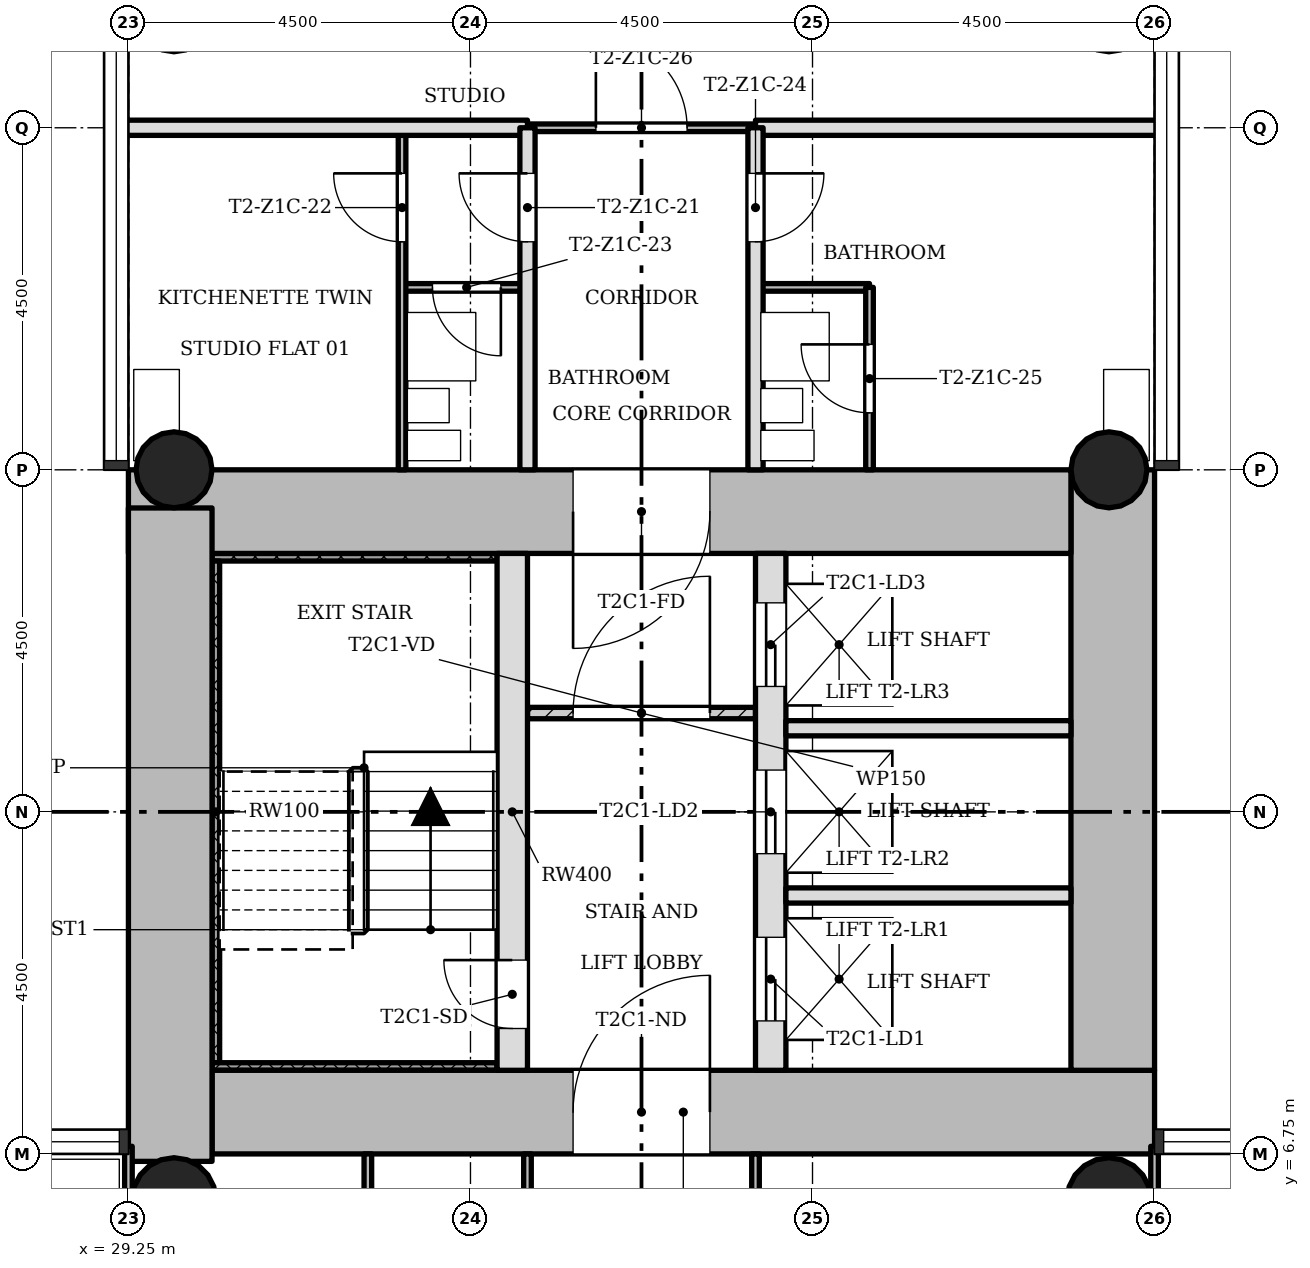
"""IFC4 building model, lengths in metres.
Left out: names, types, materials, properties, quantities, classifications, styles, units other than length and angle.
Written with IfcOpenShell. Run it as: python <this file> out.ifc"""

import sys

from ifc_helpers import new_model, si_unit, direction, frame, frame_2d, origin, origin_2d, place, context, subcontext, project, spatial, rectangle, hollow_circle, extrude, element, fill, save


model = new_model("IFC4")
c1 = context("Model", 3, precision=1e-05, world=origin(), true_north=direction((0.0, 1.0)))
c2 = subcontext(c1, "Body", "Model", "MODEL_VIEW")
j1 = project(units=[si_unit("LENGTHUNIT", "METRE"), si_unit("PLANEANGLEUNIT", "RADIAN")], contexts=[c1])
p1 = place(None, origin())
s1 = spatial("IfcSite", under=j1, at=p1, CompositionType="ELEMENT")
p2 = place(p1, origin())
s2 = spatial("IfcBuilding", under=s1, at=p2, CompositionType="ELEMENT")
p3 = place(p2, frame((0.0, 0.0, 48.3)))
s3 = spatial("IfcBuildingStorey", under=s2, at=p3, CompositionType="ELEMENT", Elevation=48.3)
p4 = place(p3, frame((30.35, 7.3, 0.0), z_axis=(0.0, 0.0, 1.0), x_axis=(1.0, 0.0, 0.0)))
e1 = element("IfcWall", 1, at=p4, inside=s3, PredefinedType="SHEAR", context=c2, shape_type="SweptSolid", body=[
    extrude(rectangle(XDim=12.4, YDim=1.1, at=frame_2d((6.2, 0.0))), origin(), (0.0, 0.0, 1.0), 3.4),
])
p5 = place(p4, frame((4.75, 0.0, 0.0)))
e2 = element("IfcOpeningElement", 2, at=p5, cuts=e1, PredefinedType="OPENING", context=c2, shape_type="SweptSolid", body=[
    extrude(rectangle(XDim=1.8, YDim=2.1, at=frame_2d((0.9, 1.05))), frame((0.0, 0.56, 0.0), z_axis=(0.0, -1.0, 0.0), x_axis=(1.0, 0.0, 0.0)), (0.0, 0.0, 1.0), 1.12),
])
p6 = place(p3, frame((42.2, 7.85, 0.0), z_axis=(0.0, 0.0, 1.0), x_axis=(0.0, 1.0, 0.0)))
e3 = element("IfcWall", 3, at=p6, inside=s3, PredefinedType="SHEAR", context=c2, shape_type="SweptSolid", body=[
    extrude(rectangle(XDim=7.9, YDim=1.1, at=frame_2d((3.95, 0.0))), origin(), (0.0, 0.0, 1.0), 3.4),
])
p7 = place(p3, frame((41.65, 15.2, 0.0), z_axis=(0.0, 0.0, 1.0), x_axis=(-1.0, 0.0, 0.0)))
e4 = element("IfcWall", 4, at=p7, inside=s3, PredefinedType="SHEAR", context=c2, shape_type="SweptSolid", body=[
    extrude(rectangle(XDim=12.4, YDim=1.1, at=frame_2d((6.2, 0.0))), origin(), (0.0, 0.0, 1.0), 3.4),
])
p8 = place(p7, frame((4.75, 0.0, 0.0)))
e5 = element("IfcOpeningElement", 5, at=p8, cuts=e4, PredefinedType="OPENING", context=c2, shape_type="SweptSolid", body=[
    extrude(rectangle(XDim=1.8, YDim=2.1, at=frame_2d((0.9, 1.05))), frame((0.0, 0.56, 0.0), z_axis=(0.0, -1.0, 0.0), x_axis=(1.0, 0.0, 0.0)), (0.0, 0.0, 1.0), 1.12),
])
p9 = place(p3, frame((29.8, 15.248, 0.0), z_axis=(0.0, 0.0, 1.0), x_axis=(0.0, -1.0, 0.0)))
e6 = element("IfcWall", 6, at=p9, inside=s3, PredefinedType="SHEAR", context=c2, shape_type="SweptSolid", body=[
    extrude(rectangle(XDim=8.596, YDim=1.1, at=frame_2d((4.298, 0.0))), origin(), (0.0, 0.0, 1.0), 3.4),
])
p10 = place(p3, frame((34.3, 7.85, 0.0), z_axis=(0.0, 0.0, 1.0), x_axis=(0.0, 1.0, 0.0)))
e7 = element("IfcWall", 7, at=p10, inside=s3, PredefinedType="SHEAR", context=c2, shape_type="SweptSolid", body=[
    extrude(rectangle(XDim=6.8, YDim=0.4, at=frame_2d((3.4, 0.0))), origin(), (0.0, 0.0, 1.0), 3.4),
])
p11 = place(p10, frame((0.55, 0.0, 0.0)))
e8 = element("IfcOpeningElement", 8, at=p11, cuts=e7, PredefinedType="OPENING", context=c2, shape_type="SweptSolid", body=[
    extrude(rectangle(XDim=0.9, YDim=2.1, at=frame_2d((0.45, 1.05))), frame((0.0, 0.21, 0.0), z_axis=(0.0, -1.0, 0.0), x_axis=(1.0, 0.0, 0.0)), (0.0, 0.0, 1.0), 0.42),
])
p12 = place(p3, frame((37.7, 7.85, 0.0), z_axis=(0.0, 0.0, 1.0), x_axis=(0.0, 1.0, 0.0)))
e9 = element("IfcWall", 9, at=p12, inside=s3, PredefinedType="SHEAR", context=c2, shape_type="SweptSolid", body=[
    extrude(rectangle(XDim=6.8, YDim=0.4, at=frame_2d((3.4, 0.0))), origin(), (0.0, 0.0, 1.0), 3.4),
])
p13 = place(p12, frame((0.65, 0.0, 0.0)))
e10 = element("IfcOpeningElement", 10, at=p13, cuts=e9, PredefinedType="OPENING", context=c2, shape_type="SweptSolid", body=[
    extrude(rectangle(XDim=1.1, YDim=2.1, at=frame_2d((0.55, 1.05))), frame((0.0, 0.21, 0.0), z_axis=(0.0, -1.0, 0.0), x_axis=(1.0, 0.0, 0.0)), (0.0, 0.0, 1.0), 0.42),
])
p14 = place(p12, frame((2.85, 0.0, 0.0)))
e11 = element("IfcOpeningElement", 11, at=p14, cuts=e9, PredefinedType="OPENING", context=c2, shape_type="SweptSolid", body=[
    extrude(rectangle(XDim=1.1, YDim=2.1, at=frame_2d((0.55, 1.05))), frame((0.0, 0.21, 0.0), z_axis=(0.0, -1.0, 0.0), x_axis=(1.0, 0.0, 0.0)), (0.0, 0.0, 1.0), 0.42),
])
p15 = place(p12, frame((5.05, 0.0, 0.0)))
e12 = element("IfcOpeningElement", 12, at=p15, cuts=e9, PredefinedType="OPENING", context=c2, shape_type="SweptSolid", body=[
    extrude(rectangle(XDim=1.1, YDim=2.1, at=frame_2d((0.55, 1.05))), frame((0.0, 0.21, 0.0), z_axis=(0.0, -1.0, 0.0), x_axis=(1.0, 0.0, 0.0)), (0.0, 0.0, 1.0), 0.42),
])
for number, where, z_axis, x_axis in (
    (13, (42.15, 15.75, 0.0), (0.0, 0.0, 1.0), (1.0, 0.0, 0.0)),
    (14, (29.85, 15.75, 0.0), (0.0, 0.0, 1.0), (1.0, 0.0, 0.0)),
):
    element("IfcColumn", number, at=place(p3, frame(where, z_axis=z_axis, x_axis=x_axis)), inside=s3, PredefinedType="COLUMN", context=c2, shape_type="SweptSolid", body=[
        extrude(hollow_circle(Radius=0.5, WallThickness=0.036, at=origin_2d()), origin(), (0.0, 0.0, 1.0), 3.4),
    ])
for number, where, z_axis, x_axis in (
    (15, (42.15, 6.15, 0.0), (0.0, 0.0, 1.0), (1.0, 0.0, 0.0)),
    (16, (29.85, 6.15, 0.0), (0.0, 0.0, 1.0), (1.0, 0.0, 0.0)),
):
    element("IfcColumn", number, at=place(p3, frame(where, z_axis=z_axis, x_axis=x_axis)), inside=s3, PredefinedType="COLUMN", context=c2, shape_type="SweptSolid", body=[
        extrude(hollow_circle(Radius=0.55, WallThickness=0.04, at=origin_2d()), origin(), (0.0, 0.0, 1.0), 3.4),
    ])
p16 = place(p3, frame((37.5, 12.55, 0.0), z_axis=(0.0, 0.0, 1.0), x_axis=(-1.0, 0.0, 0.0)))
e17 = element("IfcWall", 17, at=p16, inside=s3, PredefinedType="PARTITIONING", context=c2, shape_type="SweptSolid", body=[
    extrude(rectangle(XDim=3.0, YDim=0.15, at=frame_2d((1.5, 0.0))), origin(), (0.0, 0.0, 1.0), 3.0),
])
p17 = place(p16, frame((0.6, 0.0, 0.0)))
e18 = element("IfcOpeningElement", 18, at=p17, cuts=e17, PredefinedType="OPENING", context=c2, shape_type="SweptSolid", body=[
    extrude(rectangle(XDim=1.8, YDim=2.1, at=frame_2d((0.9, 1.05))), frame((0.0, 0.085, 0.0), z_axis=(0.0, -1.0, 0.0), x_axis=(1.0, 0.0, 0.0)), (0.0, 0.0, 1.0), 0.17),
])
for number, where, z_axis, x_axis in (
    (19, (41.65, 10.15, 0.0), (0.0, 0.0, 1.0), (-1.0, 0.0, 0.0)),
    (20, (41.65, 12.35, 0.0), (0.0, 0.0, 1.0), (-1.0, 0.0, 0.0)),
):
    element("IfcWall", number, at=place(p3, frame(where, z_axis=z_axis, x_axis=x_axis)), inside=s3, PredefinedType="SOLIDWALL", context=c2, shape_type="SweptSolid", body=[
        extrude(rectangle(XDim=3.75, YDim=0.2, at=frame_2d((1.875, 0.0))), origin(), (0.0, 0.0, 1.0), 3.0),
    ])
p18 = place(p3, frame((39.0, 18.15, 0.0), z_axis=(0.0, 0.0, 1.0), x_axis=(-1.0, 0.0, 0.0)))
e21 = element("IfcWall", 21, at=p18, inside=s3, PredefinedType="PARTITIONING", context=c2, shape_type="SweptSolid", body=[
    extrude(rectangle(XDim=1.5, YDim=0.1, at=frame_2d((0.75, 0.0))), origin(), (0.0, 0.0, 1.0), 3.0),
])
p19 = place(p3, frame((34.5, 18.15, 0.0), z_axis=(0.0, 0.0, 1.0), x_axis=(-1.0, 0.0, 0.0)))
e22 = element("IfcWall", 22, at=p19, inside=s3, PredefinedType="PARTITIONING", context=c2, shape_type="SweptSolid", body=[
    extrude(rectangle(XDim=1.65, YDim=0.1, at=frame_2d((0.825, 0.0))), origin(), (0.0, 0.0, 1.0), 3.0),
])
p20 = place(p19, frame((0.35, 0.0, 0.0)))
e23 = element("IfcOpeningElement", 23, at=p20, cuts=e22, PredefinedType="OPENING", context=c2, shape_type="SweptSolid", body=[
    extrude(rectangle(XDim=0.9, YDim=2.1, at=frame_2d((0.45, 1.05))), frame((0.0, 0.06, 0.0), z_axis=(0.0, -1.0, 0.0), x_axis=(1.0, 0.0, 0.0)), (0.0, 0.0, 1.0), 0.12),
])
p21 = place(p3, frame((37.5, 20.25, 0.0), z_axis=(0.0, 0.0, 1.0), x_axis=(-1.0, 0.0, 0.0)))
e24 = element("IfcWall", 24, at=p21, inside=s3, PredefinedType="PARTITIONING", context=c2, shape_type="SweptSolid", body=[
    extrude(rectangle(XDim=3.0, YDim=0.1, at=frame_2d((1.5, 0.0))), origin(), (0.0, 0.0, 1.0), 3.0),
])
p22 = place(p21, frame((0.9, 0.0, 0.0)))
e25 = element("IfcOpeningElement", 25, at=p22, cuts=e24, PredefinedType="OPENING", context=c2, shape_type="SweptSolid", body=[
    extrude(rectangle(XDim=1.2, YDim=2.1, at=frame_2d((0.6, 1.05))), frame((0.0, 0.06, 0.0), z_axis=(0.0, -1.0, 0.0), x_axis=(1.0, 0.0, 0.0)), (0.0, 0.0, 1.0), 0.12),
])
for number, where, z_axis, x_axis in (
    (26, (42.85, 20.25, 0.0), (0.0, 0.0, 1.0), (-1.0, 0.0, 0.0)),
    (27, (34.5, 20.25, 0.0), (0.0, 0.0, 1.0), (-1.0, 0.0, 0.0)),
):
    element("IfcWall", number, at=place(p3, frame(where, z_axis=z_axis, x_axis=x_axis)), inside=s3, PredefinedType="SOLIDWALL", context=c2, shape_type="SweptSolid", body=[
        extrude(rectangle(XDim=5.35, YDim=0.2, at=frame_2d((2.675, 0.0))), origin(), (0.0, 0.0, 1.0), 3.0),
    ])
p23 = place(p3, frame((42.75, 0.9, 0.0), z_axis=(0.0, 0.0, 1.0), x_axis=(0.0, 1.0, 0.0)))
e28 = element("IfcWall", 28, at=p23, inside=s3, PredefinedType="PARTITIONING", context=c2, shape_type="SweptSolid", body=[
    extrude(rectangle(XDim=5.95, YDim=0.1, at=frame_2d((2.975, 0.0))), origin(), (0.0, 0.0, 1.0), 3.0),
])
p24 = place(p3, frame((39.0, 15.75, 0.0), z_axis=(0.0, 0.0, 1.0), x_axis=(0.0, 1.0, 0.0)))
e29 = element("IfcWall", 29, at=p24, inside=s3, PredefinedType="PARTITIONING", context=c2, shape_type="SweptSolid", body=[
    extrude(rectangle(XDim=2.4, YDim=0.1, at=frame_2d((1.2, 0.0))), origin(), (0.0, 0.0, 1.0), 3.0),
])
p25 = place(p24, frame((0.75, 0.0, 0.0)))
e30 = element("IfcOpeningElement", 30, at=p25, cuts=e29, PredefinedType="OPENING", context=c2, shape_type="SweptSolid", body=[
    extrude(rectangle(XDim=0.9, YDim=2.1, at=frame_2d((0.45, 1.05))), frame((0.0, 0.06, 0.0), z_axis=(0.0, -1.0, 0.0), x_axis=(1.0, 0.0, 0.0)), (0.0, 0.0, 1.0), 0.12),
])
p26 = place(p3, frame((37.5, 0.9, 0.0), z_axis=(0.0, 0.0, 1.0), x_axis=(0.0, 1.0, 0.0)))
e31 = element("IfcWall", 31, at=p26, inside=s3, PredefinedType="PARTITIONING", context=c2, shape_type="SweptSolid", body=[
    extrude(rectangle(XDim=5.85, YDim=0.1, at=frame_2d((2.925, 0.0))), origin(), (0.0, 0.0, 1.0), 3.0),
])
p27 = place(p26, frame((2.475, 0.0, 0.0)))
e32 = element("IfcOpeningElement", 32, at=p27, cuts=e31, PredefinedType="OPENING", context=c2, shape_type="SweptSolid", body=[
    extrude(rectangle(XDim=0.9, YDim=2.1, at=frame_2d((0.45, 1.05))), frame((0.0, 0.06, 0.0), z_axis=(0.0, -1.0, 0.0), x_axis=(1.0, 0.0, 0.0)), (0.0, 0.0, 1.0), 0.12),
])
p28 = place(p3, frame((37.5, 15.75, 0.0), z_axis=(0.0, 0.0, 1.0), x_axis=(0.0, 1.0, 0.0)))
e33 = element("IfcWall", 33, at=p28, inside=s3, PredefinedType="SOLIDWALL", context=c2, shape_type="SweptSolid", body=[
    extrude(rectangle(XDim=4.5, YDim=0.2, at=frame_2d((2.25, 0.0))), origin(), (0.0, 0.0, 1.0), 3.0),
])
p29 = place(p28, frame((3.0, 0.0, 0.0)))
e34 = element("IfcOpeningElement", 34, at=p29, cuts=e33, PredefinedType="OPENING", context=c2, shape_type="SweptSolid", body=[
    extrude(rectangle(XDim=0.9, YDim=2.1, at=frame_2d((0.45, 1.05))), frame((0.0, 0.11, 0.0), z_axis=(0.0, -1.0, 0.0), x_axis=(1.0, 0.0, 0.0)), (0.0, 0.0, 1.0), 0.22),
])
p30 = place(p3, frame((34.5, 0.9, 0.0), z_axis=(0.0, 0.0, 1.0), x_axis=(0.0, 1.0, 0.0)))
e35 = element("IfcWall", 35, at=p30, inside=s3, PredefinedType="PARTITIONING", context=c2, shape_type="SweptSolid", body=[
    extrude(rectangle(XDim=5.85, YDim=0.1, at=frame_2d((2.925, 0.0))), origin(), (0.0, 0.0, 1.0), 3.0),
])
p31 = place(p30, frame((2.475, 0.0, 0.0)))
e36 = element("IfcOpeningElement", 36, at=p31, cuts=e35, PredefinedType="OPENING", context=c2, shape_type="SweptSolid", body=[
    extrude(rectangle(XDim=0.9, YDim=2.1, at=frame_2d((0.45, 1.05))), frame((0.0, 0.06, 0.0), z_axis=(0.0, -1.0, 0.0), x_axis=(1.0, 0.0, 0.0)), (0.0, 0.0, 1.0), 0.12),
])
p32 = place(p3, frame((34.5, 15.75, 0.0), z_axis=(0.0, 0.0, 1.0), x_axis=(0.0, 1.0, 0.0)))
e37 = element("IfcWall", 37, at=p32, inside=s3, PredefinedType="SOLIDWALL", context=c2, shape_type="SweptSolid", body=[
    extrude(rectangle(XDim=4.5, YDim=0.2, at=frame_2d((2.25, 0.0))), origin(), (0.0, 0.0, 1.0), 3.0),
])
p33 = place(p32, frame((3.0, 0.0, 0.0)))
e38 = element("IfcOpeningElement", 38, at=p33, cuts=e37, PredefinedType="OPENING", context=c2, shape_type="SweptSolid", body=[
    extrude(rectangle(XDim=0.9, YDim=2.1, at=frame_2d((0.45, 1.05))), frame((0.0, 0.11, 0.0), z_axis=(0.0, -1.0, 0.0), x_axis=(1.0, 0.0, 0.0)), (0.0, 0.0, 1.0), 0.22),
])
p34 = place(p3, frame((32.85, 15.75, 0.0), z_axis=(0.0, 0.0, 1.0), x_axis=(0.0, 1.0, 0.0)))
e39 = element("IfcWall", 39, at=p34, inside=s3, PredefinedType="PARTITIONING", context=c2, shape_type="SweptSolid", body=[
    extrude(rectangle(XDim=4.5, YDim=0.1, at=frame_2d((2.25, 0.0))), origin(), (0.0, 0.0, 1.0), 3.0),
])
p35 = place(p34, frame((3.0, 0.0, 0.0)))
e40 = element("IfcOpeningElement", 40, at=p35, cuts=e39, PredefinedType="OPENING", context=c2, shape_type="SweptSolid", body=[
    extrude(rectangle(XDim=0.9, YDim=2.1, at=frame_2d((0.45, 1.05))), frame((0.0, 0.06, 0.0), z_axis=(0.0, -1.0, 0.0), x_axis=(1.0, 0.0, 0.0)), (0.0, 0.0, 1.0), 0.12),
])
p36 = place(p3, frame((32.4, 0.9, 0.0), z_axis=(0.0, 0.0, 1.0), x_axis=(0.0, 1.0, 0.0)))
e41 = element("IfcWall", 41, at=p36, inside=s3, PredefinedType="PARTITIONING", context=c2, shape_type="SweptSolid", body=[
    extrude(rectangle(XDim=5.85, YDim=0.1, at=frame_2d((2.925, 0.0))), origin(), (0.0, 0.0, 1.0), 3.0),
])
p37 = place(p3, frame((29.25, 0.9, 0.0), z_axis=(0.0, 0.0, 1.0), x_axis=(0.0, 1.0, 0.0)))
e42 = element("IfcWall", 42, at=p37, inside=s3, PredefinedType="PARTITIONING", context=c2, shape_type="SweptSolid", body=[
    extrude(rectangle(XDim=5.95, YDim=0.1, at=frame_2d((2.975, 0.0))), origin(), (0.0, 0.0, 1.0), 3.0),
])
p38 = place(p3, frame((34.1, 14.6, 0.0), z_axis=(0.0, 0.0, 1.0), x_axis=(-1.0, 0.0, 0.0)))
e43 = element("IfcWall", 43, at=p38, inside=s3, PredefinedType="SHEAR", context=c2, shape_type="SweptSolid", body=[
    extrude(rectangle(XDim=3.75, YDim=0.1, at=frame_2d((1.875, 0.0))), origin(), (0.0, 0.0, 1.0), 3.4),
])
p39 = place(p3, frame((30.4, 7.95, 0.0), z_axis=(0.0, 0.0, 1.0), x_axis=(0.0, 1.0, 0.0)))
e44 = element("IfcWall", 44, at=p39, inside=s3, PredefinedType="SHEAR", context=c2, shape_type="SweptSolid", body=[
    extrude(rectangle(XDim=6.6, YDim=0.1, at=frame_2d((3.3, 0.0))), origin(), (0.0, 0.0, 1.0), 3.4),
])
p40 = place(p3, frame((34.1, 7.9, 0.0), z_axis=(0.0, 0.0, 1.0), x_axis=(-1.0, 0.0, 0.0)))
e45 = element("IfcWall", 45, at=p40, inside=s3, PredefinedType="SHEAR", context=c2, shape_type="SweptSolid", body=[
    extrude(rectangle(XDim=3.75, YDim=0.1, at=frame_2d((1.875, 0.0))), origin(), (0.0, 0.0, 1.0), 3.4),
])
p41 = place(p17, origin())
e46 = element("IfcDoor", 46, at=p41, inside=s3, OperationType="SINGLE_SWING_LEFT", PredefinedType="DOOR", context=c2, shape_type="SweptSolid", body=[
    extrude(rectangle(XDim=1.8, YDim=2.1, at=frame_2d((0.9, 1.05))), frame((0.0, 0.025, 0.0), z_axis=(0.0, -1.0, 0.0), x_axis=(1.0, 0.0, 0.0)), (0.0, 0.0, 1.0), 0.05),
])
fill(e18, e46)
p42 = place(p33, origin())
e47 = element("IfcDoor", 47, at=p42, inside=s3, OperationType="SINGLE_SWING_LEFT", PredefinedType="DOOR", context=c2, shape_type="SweptSolid", body=[
    extrude(rectangle(XDim=0.9, YDim=2.1, at=frame_2d((0.45, 1.05))), frame((0.0, 0.025, 0.0), z_axis=(0.0, -1.0, 0.0), x_axis=(1.0, 0.0, 0.0)), (0.0, 0.0, 1.0), 0.05),
])
fill(e38, e47)
p43 = place(p35, origin())
e48 = element("IfcDoor", 48, at=p43, inside=s3, OperationType="SINGLE_SWING_LEFT", PredefinedType="DOOR", context=c2, shape_type="SweptSolid", body=[
    extrude(rectangle(XDim=0.9, YDim=2.1, at=frame_2d((0.45, 1.05))), frame((0.0, 0.025, 0.0), z_axis=(0.0, -1.0, 0.0), x_axis=(1.0, 0.0, 0.0)), (0.0, 0.0, 1.0), 0.05),
])
fill(e40, e48)
p44 = place(p20, origin())
e49 = element("IfcDoor", 49, at=p44, inside=s3, OperationType="SINGLE_SWING_RIGHT", PredefinedType="DOOR", context=c2, shape_type="SweptSolid", body=[
    extrude(rectangle(XDim=0.9, YDim=2.1, at=frame_2d((0.45, 1.05))), frame((0.0, 0.025, 0.0), z_axis=(0.0, -1.0, 0.0), x_axis=(1.0, 0.0, 0.0)), (0.0, 0.0, 1.0), 0.05),
])
fill(e23, e49)
p45 = place(p29, origin())
e50 = element("IfcDoor", 50, at=p45, inside=s3, OperationType="SINGLE_SWING_RIGHT", PredefinedType="DOOR", context=c2, shape_type="SweptSolid", body=[
    extrude(rectangle(XDim=0.9, YDim=2.1, at=frame_2d((0.45, 1.05))), frame((0.0, 0.025, 0.0), z_axis=(0.0, -1.0, 0.0), x_axis=(1.0, 0.0, 0.0)), (0.0, 0.0, 1.0), 0.05),
])
fill(e34, e50)
p46 = place(p25, origin())
e51 = element("IfcDoor", 51, at=p46, inside=s3, OperationType="SINGLE_SWING_LEFT", PredefinedType="DOOR", context=c2, shape_type="SweptSolid", body=[
    extrude(rectangle(XDim=0.9, YDim=2.1, at=frame_2d((0.45, 1.05))), frame((0.0, 0.025, 0.0), z_axis=(0.0, -1.0, 0.0), x_axis=(1.0, 0.0, 0.0)), (0.0, 0.0, 1.0), 0.05),
])
fill(e30, e51)
p47 = place(p22, origin())
e52 = element("IfcDoor", 52, at=p47, inside=s3, OperationType="SINGLE_SWING_RIGHT", PredefinedType="DOOR", context=c2, shape_type="SweptSolid", body=[
    extrude(rectangle(XDim=1.2, YDim=2.1, at=frame_2d((0.6, 1.05))), frame((0.0, 0.025, 0.0), z_axis=(0.0, -1.0, 0.0), x_axis=(1.0, 0.0, 0.0)), (0.0, 0.0, 1.0), 0.05),
])
fill(e25, e52)
p48 = place(p11, origin())
e53 = element("IfcDoor", 53, at=p48, inside=s3, OperationType="SINGLE_SWING_LEFT", PredefinedType="DOOR", context=c2, shape_type="SweptSolid", body=[
    extrude(rectangle(XDim=0.9, YDim=2.1, at=frame_2d((0.45, 1.05))), frame((0.0, 0.025, 0.0), z_axis=(0.0, -1.0, 0.0), x_axis=(1.0, 0.0, 0.0)), (0.0, 0.0, 1.0), 0.05),
])
fill(e8, e53)
p49 = place(p13, origin())
e54 = element("IfcDoor", 54, at=p49, inside=s3, OperationType="SLIDING_TO_LEFT", PredefinedType="DOOR", context=c2, shape_type="SweptSolid", body=[
    extrude(rectangle(XDim=1.1, YDim=2.1, at=frame_2d((0.55, 1.05))), frame((0.0, 0.025, 0.0), z_axis=(0.0, -1.0, 0.0), x_axis=(1.0, 0.0, 0.0)), (0.0, 0.0, 1.0), 0.05),
])
fill(e10, e54)
p50 = place(p14, origin())
e55 = element("IfcDoor", 55, at=p50, inside=s3, OperationType="SLIDING_TO_LEFT", PredefinedType="DOOR", context=c2, shape_type="SweptSolid", body=[
    extrude(rectangle(XDim=1.1, YDim=2.1, at=frame_2d((0.55, 1.05))), frame((0.0, 0.025, 0.0), z_axis=(0.0, -1.0, 0.0), x_axis=(1.0, 0.0, 0.0)), (0.0, 0.0, 1.0), 0.05),
])
fill(e11, e55)
p51 = place(p15, origin())
e56 = element("IfcDoor", 56, at=p51, inside=s3, OperationType="SLIDING_TO_LEFT", PredefinedType="DOOR", context=c2, shape_type="SweptSolid", body=[
    extrude(rectangle(XDim=1.1, YDim=2.1, at=frame_2d((0.55, 1.05))), frame((0.0, 0.025, 0.0), z_axis=(0.0, -1.0, 0.0), x_axis=(1.0, 0.0, 0.0)), (0.0, 0.0, 1.0), 0.05),
])
fill(e12, e56)
p52 = place(p5, origin())
e57 = element("IfcDoor", 57, at=p52, inside=s3, OperationType="SINGLE_SWING_LEFT", PredefinedType="DOOR", context=c2, shape_type="SweptSolid", body=[
    extrude(rectangle(XDim=1.8, YDim=2.1, at=frame_2d((0.9, 1.05))), frame((0.0, 0.025, 0.0), z_axis=(0.0, -1.0, 0.0), x_axis=(1.0, 0.0, 0.0)), (0.0, 0.0, 1.0), 0.05),
])
fill(e2, e57)
p53 = place(p8, origin())
e58 = element("IfcDoor", 58, at=p53, inside=s3, OperationType="SINGLE_SWING_LEFT", PredefinedType="DOOR", context=c2, shape_type="SweptSolid", body=[
    extrude(rectangle(XDim=1.8, YDim=2.1, at=frame_2d((0.9, 1.05))), frame((0.0, 0.025, 0.0), z_axis=(0.0, -1.0, 0.0), x_axis=(1.0, 0.0, 0.0)), (0.0, 0.0, 1.0), 0.05),
])
fill(e5, e58)
save(model, sys.argv[1])
